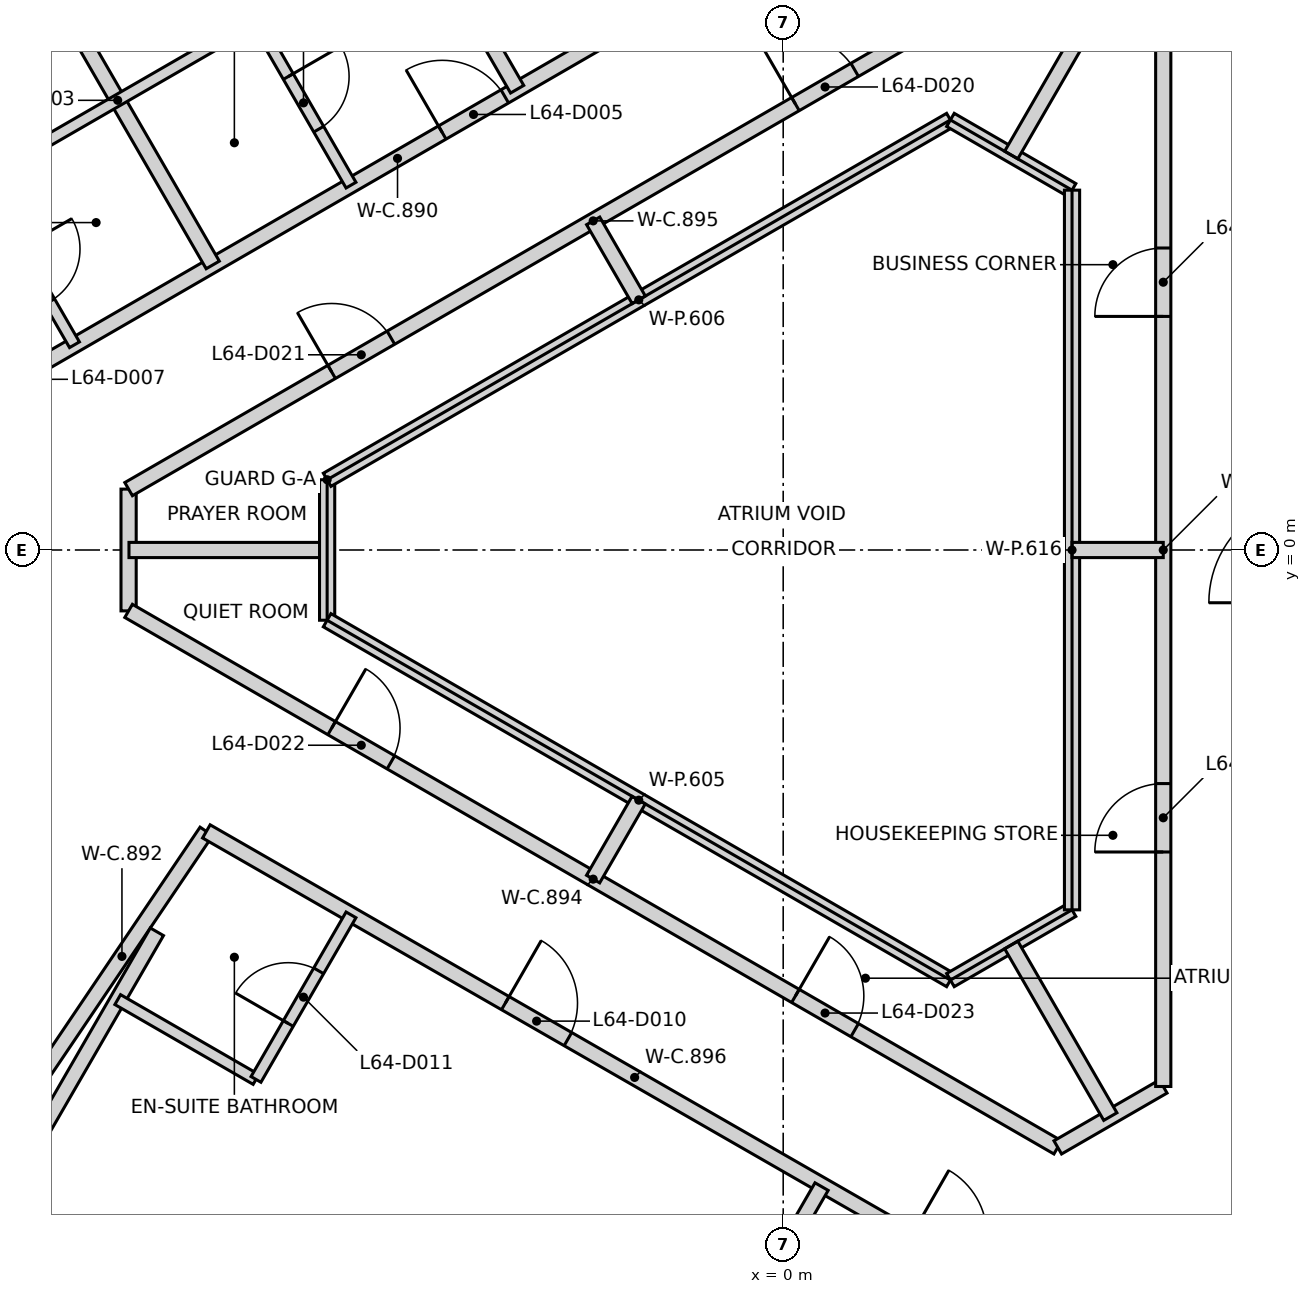
"""IFC4 building model, lengths in metres.
Left out: names, types, materials, properties, quantities, classifications, styles, units other than length and angle.
Written with IfcOpenShell. Run it as: python <this file> out.ifc"""

import sys

from ifc_helpers import new_model, si_unit, direction, frame, frame_2d, origin, place, context, subcontext, project, spatial, rectangle, extrude, element, fill, save


model = new_model("IFC4")
c1 = context("Model", 3, precision=1e-05, world=origin(), true_north=direction((0.0, 1.0)))
c2 = subcontext(c1, "Body", "Model", "MODEL_VIEW")
j1 = project(units=[si_unit("LENGTHUNIT", "METRE"), si_unit("PLANEANGLEUNIT", "RADIAN")], contexts=[c1])
p1 = place(None, origin())
s1 = spatial("IfcSite", under=j1, at=p1, CompositionType="ELEMENT")
p2 = place(p1, origin())
s2 = spatial("IfcBuilding", under=s1, at=p2, CompositionType="ELEMENT")
p3 = place(p2, frame((0.0, 0.0, 253.8)))
s3 = spatial("IfcBuildingStorey", under=s2, at=p3, CompositionType="ELEMENT", Elevation=253.8)
p4 = place(p3, frame((10.42, 6.498, 0.0), z_axis=(0.0, 0.0, 1.0), x_axis=(-0.866021906294, 0.500006057782, 0.0)))
e1 = element("IfcWall", 1, at=p4, inside=s3, PredefinedType="SHEAR", context=c2, shape_type="SweptSolid", body=[
    extrude(rectangle(XDim=11.55, YDim=0.25, at=frame_2d((5.775, 0.0))), origin(), (0.0, 0.0, 1.0), 3.2),
])
p5 = place(p4, frame((10.025, 0.0, 0.0)))
e2 = element("IfcOpeningElement", 2, at=p5, cuts=e1, PredefinedType="OPENING", context=c2, shape_type="SweptSolid", body=[
    extrude(rectangle(XDim=1.2, YDim=2.1, at=frame_2d((0.6, 1.05))), frame((0.0, 0.135, 0.0), z_axis=(0.0, -1.0, 0.0), x_axis=(1.0, 0.0, 0.0)), (0.0, 0.0, 1.0), 0.27),
])
p6 = place(p4, frame((8.725, 0.0, 0.0)))
e3 = element("IfcOpeningElement", 3, at=p6, cuts=e1, PredefinedType="OPENING", context=c2, shape_type="SweptSolid", body=[
    extrude(rectangle(XDim=1.2, YDim=2.1, at=frame_2d((0.6, 1.05))), frame((0.0, 0.135, 0.0), z_axis=(0.0, -1.0, 0.0), x_axis=(1.0, 0.0, 0.0)), (0.0, 0.0, 1.0), 0.27),
])
p7 = place(p3, frame((0.417, -12.273, 0.0), z_axis=(0.0, 0.0, 1.0), x_axis=(0.866021906294, 0.500006057782, 0.0)))
e4 = element("IfcWall", 4, at=p7, inside=s3, PredefinedType="SHEAR", context=c2, shape_type="SweptSolid", body=[
    extrude(rectangle(XDim=11.55, YDim=0.25, at=frame_2d((5.775, 0.0))), origin(), (0.0, 0.0, 1.0), 3.2),
])
p8 = place(p7, frame((10.025, 0.0, 0.0)))
e5 = element("IfcOpeningElement", 5, at=p8, cuts=e4, PredefinedType="OPENING", context=c2, shape_type="SweptSolid", body=[
    extrude(rectangle(XDim=1.2, YDim=2.1, at=frame_2d((0.6, 1.05))), frame((0.0, 0.135, 0.0), z_axis=(0.0, -1.0, 0.0), x_axis=(1.0, 0.0, 0.0)), (0.0, 0.0, 1.0), 0.27),
])
p9 = place(p7, frame((8.725, 0.0, 0.0)))
e6 = element("IfcOpeningElement", 6, at=p9, cuts=e4, PredefinedType="OPENING", context=c2, shape_type="SweptSolid", body=[
    extrude(rectangle(XDim=1.2, YDim=2.1, at=frame_2d((0.6, 1.05))), frame((0.0, 0.135, 0.0), z_axis=(0.0, -1.0, 0.0), x_axis=(1.0, 0.0, 0.0)), (0.0, 0.0, 1.0), 0.27),
])
p10 = place(p3, frame((-10.652, 1.928, 0.0), z_axis=(0.0, 0.0, 1.0), x_axis=(0.865793573301, 0.500401327367, 0.0)))
e7 = element("IfcWall", 7, at=p10, inside=s3, PredefinedType="PARTITIONING", context=c2, shape_type="SweptSolid", body=[
    extrude(rectangle(XDim=12.886, YDim=0.2, at=frame_2d((6.443, 0.0))), origin(), (0.0, 0.0, 1.0), 3.2),
])
p11 = place(p10, frame((7.123, 0.0, 0.0)))
e8 = element("IfcOpeningElement", 8, at=p11, cuts=e7, PredefinedType="OPENING", context=c2, shape_type="SweptSolid", body=[
    extrude(rectangle(XDim=0.95, YDim=2.1, at=frame_2d((0.475, 1.05))), frame((0.0, 0.11, 0.0), z_axis=(0.0, -1.0, 0.0), x_axis=(1.0, 0.0, 0.0)), (0.0, 0.0, 1.0), 0.22),
])
p12 = place(p10, frame((0.16, 0.0, 0.0)))
e9 = element("IfcOpeningElement", 9, at=p12, cuts=e7, PredefinedType="OPENING", context=c2, shape_type="SweptSolid", body=[
    extrude(rectangle(XDim=0.95, YDim=2.1, at=frame_2d((0.475, 1.05))), frame((0.0, 0.11, 0.0), z_axis=(0.0, -1.0, 0.0), x_axis=(1.0, 0.0, 0.0)), (0.0, 0.0, 1.0), 0.22),
])
p13 = place(p3, frame((-9.81, -6.991, 0.0), z_axis=(0.0, 0.0, 1.0), x_axis=(0.559616535009, 0.828751671941, 0.0)))
e10 = element("IfcWall", 10, at=p13, inside=s3, PredefinedType="PARTITIONING", context=c2, shape_type="SweptSolid", body=[
    extrude(rectangle(XDim=3.969, YDim=0.2, at=frame_2d((1.984, 0.0))), origin(), (0.0, 0.0, 1.0), 3.2),
])
p14 = place(p3, frame((-8.612, -0.801, 0.0), z_axis=(0.0, 0.0, 1.0), x_axis=(0.0, 1.0, 0.0)))
e11 = element("IfcWall", 11, at=p14, inside=s3, PredefinedType="PARTITIONING", context=c2, shape_type="SweptSolid", body=[
    extrude(rectangle(XDim=1.602, YDim=0.2, at=frame_2d((0.801, 0.0))), origin(), (0.0, 0.0, 1.0), 3.2),
])
p15 = place(p3, frame((-8.612, -0.801, 0.0), z_axis=(0.0, 0.0, 1.0), x_axis=(0.865998070783, -0.50004733916, 0.0)))
e12 = element("IfcWall", 12, at=p15, inside=s3, PredefinedType="PARTITIONING", context=c2, shape_type="SweptSolid", body=[
    extrude(rectangle(XDim=14.115, YDim=0.2, at=frame_2d((7.058, 0.0))), origin(), (0.0, 0.0, 1.0), 3.2),
])
p16 = place(p15, frame((3.085, 0.0, 0.0)))
e13 = element("IfcOpeningElement", 13, at=p16, cuts=e12, PredefinedType="OPENING", context=c2, shape_type="SweptSolid", body=[
    extrude(rectangle(XDim=0.9, YDim=2.1, at=frame_2d((0.45, 1.05))), frame((0.0, 0.11, 0.0), z_axis=(0.0, -1.0, 0.0), x_axis=(1.0, 0.0, 0.0)), (0.0, 0.0, 1.0), 0.22),
])
p17 = place(p15, frame((10.131, 0.0, 0.0)))
e14 = element("IfcOpeningElement", 14, at=p17, cuts=e12, PredefinedType="OPENING", context=c2, shape_type="SweptSolid", body=[
    extrude(rectangle(XDim=0.9, YDim=2.1, at=frame_2d((0.45, 1.05))), frame((0.0, 0.11, 0.0), z_axis=(0.0, -1.0, 0.0), x_axis=(1.0, 0.0, 0.0)), (0.0, 0.0, 1.0), 0.22),
])
p18 = place(p3, frame((-8.612, 0.801, 0.0), z_axis=(0.0, 0.0, 1.0), x_axis=(0.866005560651, 0.500034367741, 0.0)))
e15 = element("IfcWall", 15, at=p18, inside=s3, PredefinedType="PARTITIONING", context=c2, shape_type="SweptSolid", body=[
    extrude(rectangle(XDim=14.115, YDim=0.2, at=frame_2d((7.058, 0.0))), origin(), (0.0, 0.0, 1.0), 3.2),
])
p19 = place(p18, frame((10.131, 0.0, 0.0)))
e16 = element("IfcOpeningElement", 16, at=p19, cuts=e15, PredefinedType="OPENING", context=c2, shape_type="SweptSolid", body=[
    extrude(rectangle(XDim=0.9, YDim=2.1, at=frame_2d((0.45, 1.05))), frame((0.0, 0.11, 0.0), z_axis=(0.0, -1.0, 0.0), x_axis=(1.0, 0.0, 0.0)), (0.0, 0.0, 1.0), 0.22),
])
p20 = place(p18, frame((3.085, 0.0, 0.0)))
e17 = element("IfcOpeningElement", 17, at=p20, cuts=e15, PredefinedType="OPENING", context=c2, shape_type="SweptSolid", body=[
    extrude(rectangle(XDim=0.9, YDim=2.1, at=frame_2d((0.45, 1.05))), frame((0.0, 0.11, 0.0), z_axis=(0.0, -1.0, 0.0), x_axis=(1.0, 0.0, 0.0)), (0.0, 0.0, 1.0), 0.22),
])
p21 = place(p3, frame((-7.589, -3.702, 0.0), z_axis=(0.0, 0.0, 1.0), x_axis=(0.867107959402, -0.498120253293, 0.0)))
e18 = element("IfcWall", 18, at=p21, inside=s3, PredefinedType="PARTITIONING", context=c2, shape_type="SweptSolid", body=[
    extrude(rectangle(XDim=12.996, YDim=0.2, at=frame_2d((6.498, 0.0))), origin(), (0.0, 0.0, 1.0), 3.2),
])
p22 = place(p21, frame((4.536, 0.0, 0.0)))
e19 = element("IfcOpeningElement", 19, at=p22, cuts=e18, PredefinedType="OPENING", context=c2, shape_type="SweptSolid", body=[
    extrude(rectangle(XDim=0.95, YDim=2.1, at=frame_2d((0.475, 1.05))), frame((0.0, 0.11, 0.0), z_axis=(0.0, -1.0, 0.0), x_axis=(1.0, 0.0, 0.0)), (0.0, 0.0, 1.0), 0.22),
])
p23 = place(p21, frame((10.691, 0.0, 0.0)))
e20 = element("IfcOpeningElement", 20, at=p23, cuts=e18, PredefinedType="OPENING", context=c2, shape_type="SweptSolid", body=[
    extrude(rectangle(XDim=1.0, YDim=2.1, at=frame_2d((0.5, 1.05))), frame((0.0, 0.11, 0.0), z_axis=(0.0, -1.0, 0.0), x_axis=(1.0, 0.0, 0.0)), (0.0, 0.0, 1.0), 0.22),
])
p24 = place(p3, frame((3.612, -7.859, 0.0), z_axis=(0.0, 0.0, 1.0), x_axis=(0.866002901518, 0.500038973044, 0.0)))
e21 = element("IfcWall", 21, at=p24, inside=s3, PredefinedType="PARTITIONING", context=c2, shape_type="SweptSolid", body=[
    extrude(rectangle(XDim=1.602, YDim=0.2, at=frame_2d((0.801, 0.0))), origin(), (0.0, 0.0, 1.0), 3.2),
])
p25 = place(p3, frame((5.0, -7.058, 0.0), z_axis=(0.0, 0.0, 1.0), x_axis=(0.0, 1.0, 0.0)))
e22 = element("IfcWall", 22, at=p25, inside=s3, PredefinedType="PARTITIONING", context=c2, shape_type="SweptSolid", body=[
    extrude(rectangle(XDim=14.116, YDim=0.2, at=frame_2d((7.058, 0.0))), origin(), (0.0, 0.0, 1.0), 3.2),
])
p26 = place(p25, frame((3.085, 0.0, 0.0)))
e23 = element("IfcOpeningElement", 23, at=p26, cuts=e22, PredefinedType="OPENING", context=c2, shape_type="SweptSolid", body=[
    extrude(rectangle(XDim=0.9, YDim=2.1, at=frame_2d((0.45, 1.05))), frame((0.0, 0.11, 0.0), z_axis=(0.0, -1.0, 0.0), x_axis=(1.0, 0.0, 0.0)), (0.0, 0.0, 1.0), 0.22),
])
p27 = place(p25, frame((10.131, 0.0, 0.0)))
e24 = element("IfcOpeningElement", 24, at=p27, cuts=e22, PredefinedType="OPENING", context=c2, shape_type="SweptSolid", body=[
    extrude(rectangle(XDim=0.9, YDim=2.1, at=frame_2d((0.45, 1.05))), frame((0.0, 0.11, 0.0), z_axis=(0.0, -1.0, 0.0), x_axis=(1.0, 0.0, 0.0)), (0.0, 0.0, 1.0), 0.22),
])
p28 = place(p3, frame((-13.107, 13.453, 0.0), z_axis=(0.0, 0.0, 1.0), x_axis=(0.50003870279, -0.866003057565, 0.0)))
e25 = element("IfcWall", 25, at=p28, inside=s3, PredefinedType="PARTITIONING", context=c2, shape_type="SweptSolid", body=[
    extrude(rectangle(XDim=11.204, YDim=0.2, at=frame_2d((5.602, 0.0))), origin(), (0.0, 0.0, 1.0), 3.2),
])
p29 = place(p3, frame((-13.107, -13.453, 0.0), z_axis=(0.0, 0.0, 1.0), x_axis=(0.500058218288, 0.865991788831, 0.0)))
e26 = element("IfcWall", 26, at=p29, inside=s3, PredefinedType="PARTITIONING", context=c2, shape_type="SweptSolid", body=[
    extrude(rectangle(XDim=9.735, YDim=0.2, at=frame_2d((4.867, 0.0))), origin(), (0.0, 0.0, 1.0), 3.2),
])
p30 = place(p3, frame((-9.119, 15.795, 0.0), z_axis=(0.0, 0.0, 1.0), x_axis=(0.500015176972, -0.866016641178, 0.0)))
e27 = element("IfcWall", 27, at=p30, inside=s3, PredefinedType="PARTITIONING", context=c2, shape_type="SweptSolid", body=[
    extrude(rectangle(XDim=11.239, YDim=0.2, at=frame_2d((5.619, 0.0))), origin(), (0.0, 0.0, 1.0), 3.2),
])
p31 = place(p3, frame((-8.607, 0.0, 0.0), z_axis=(0.0, 0.0, 1.0), x_axis=(1.0, 0.0, 0.0)))
e28 = element("IfcWall", 28, at=p31, inside=s3, PredefinedType="PARTITIONING", context=c2, shape_type="SweptSolid", body=[
    extrude(rectangle(XDim=2.607, YDim=0.2, at=frame_2d((1.303, 0.0))), origin(), (0.0, 0.0, 1.0), 3.2),
])
p32 = place(p3, frame((-6.0, -0.924, 0.0), z_axis=(0.0, 0.0, 1.0), x_axis=(0.0, 1.0, 0.0)))
e29 = element("IfcWall", 29, at=p32, inside=s3, PredefinedType="PARTITIONING", context=c2, shape_type="SweptSolid", body=[
    extrude(rectangle(XDim=1.848, YDim=0.2, at=frame_2d((0.924, 0.0))), origin(), (0.0, 0.0, 1.0), 3.2),
])
for number, where, z_axis, x_axis in (
    (30, (-6.0, -0.924, 0.0), (0.0, 0.0, 1.0), (0.866, -0.5, 0.0)),
    (31, (-6.0, 0.924, 0.0), (0.0, 0.0, 1.0), (0.866, 0.5, 0.0)),
):
    element("IfcWall", number, at=place(p3, frame(where, z_axis=z_axis, x_axis=x_axis)), inside=s3, PredefinedType="PARTITIONING", context=c2, shape_type="SweptSolid", body=[
        extrude(rectangle(XDim=9.468, YDim=0.2, at=frame_2d((4.734, 0.0))), origin(), (0.0, 0.0, 1.0), 3.2),
    ])
p33 = place(p3, frame((-5.097, -18.078, 0.0), z_axis=(0.0, 0.0, 1.0), x_axis=(0.49996389635, 0.866046247233, 0.0)))
e32 = element("IfcWall", 32, at=p33, inside=s3, PredefinedType="PARTITIONING", context=c2, shape_type="SweptSolid", body=[
    extrude(rectangle(XDim=11.204, YDim=0.2, at=frame_2d((5.602, 0.0))), origin(), (0.0, 0.0, 1.0), 3.2),
])
for number, where, z_axis, x_axis in (
    (33, (-2.501, -4.329, 0.0), (0.0, 0.0, 1.0), (0.5, 0.866, 0.0)),
    (34, (-2.5, 4.33, 0.0), (0.0, 0.0, 1.0), (0.5, -0.866, 0.0)),
):
    element("IfcWall", number, at=place(p3, frame(where, z_axis=z_axis, x_axis=x_axis)), inside=s3, PredefinedType="PARTITIONING", context=c2, shape_type="SweptSolid", body=[
        extrude(rectangle(XDim=1.2, YDim=0.2, at=frame_2d((0.6, 0.0))), origin(), (0.0, 0.0, 1.0), 3.2),
    ])
for number, where, z_axis, x_axis in (
    (35, (2.2, -5.658, 0.0), (0.0, 0.0, 1.0), (0.866, 0.5, 0.0)),
    (36, (2.2, 5.658, 0.0), (0.0, 0.0, 1.0), (0.866, -0.5, 0.0)),
):
    element("IfcWall", number, at=place(p3, frame(where, z_axis=z_axis, x_axis=x_axis)), inside=s3, PredefinedType="PARTITIONING", context=c2, shape_type="SweptSolid", body=[
        extrude(rectangle(XDim=1.848, YDim=0.2, at=frame_2d((0.924, 0.0))), origin(), (0.0, 0.0, 1.0), 3.2),
    ])
for number, where, z_axis, x_axis in (
    (37, (3.0, 5.196, 0.0), (0.0, 0.0, 1.0), (0.5, 0.866, 0.0)),
    (38, (3.0, -5.196, 0.0), (0.0, 0.0, 1.0), (0.5, -0.866, 0.0)),
):
    element("IfcWall", number, at=place(p3, frame(where, z_axis=z_axis, x_axis=x_axis)), inside=s3, PredefinedType="PARTITIONING", context=c2, shape_type="SweptSolid", body=[
        extrude(rectangle(XDim=2.607, YDim=0.2, at=frame_2d((1.304, 0.0))), origin(), (0.0, 0.0, 1.0), 3.2),
    ])
p34 = place(p3, frame((3.8, -4.734, 0.0), z_axis=(0.0, 0.0, 1.0), x_axis=(0.0, 1.0, 0.0)))
e39 = element("IfcWall", 39, at=p34, inside=s3, PredefinedType="PARTITIONING", context=c2, shape_type="SweptSolid", body=[
    extrude(rectangle(XDim=9.468, YDim=0.2, at=frame_2d((4.734, 0.0))), origin(), (0.0, 0.0, 1.0), 3.2),
])
p35 = place(p3, frame((3.8, 0.0, 0.0), z_axis=(0.0, 0.0, 1.0), x_axis=(1.0, 0.0, 0.0)))
e40 = element("IfcWall", 40, at=p35, inside=s3, PredefinedType="PARTITIONING", context=c2, shape_type="SweptSolid", body=[
    extrude(rectangle(XDim=1.2, YDim=0.2, at=frame_2d((0.6, 0.0))), origin(), (0.0, 0.0, 1.0), 3.2),
])
p36 = place(p3, frame((-10.574, 4.866, 0.0), z_axis=(0.0, 0.0, 1.0), x_axis=(0.866052994476, 0.499952208475, 0.0)))
e41 = element("IfcWall", 41, at=p36, inside=s3, PredefinedType="PARTITIONING", context=c2, shape_type="SweptSolid", body=[
    extrude(rectangle(XDim=4.201, YDim=0.15, at=frame_2d((2.1, 0.0))), origin(), (0.0, 0.0, 1.0), 3.2),
])
p37 = place(p3, frame((-10.574, 4.865, 0.0), z_axis=(0.0, 0.0, 1.0), x_axis=(0.500004234368, -0.866022959057, 0.0)))
e42 = element("IfcWall", 42, at=p37, inside=s3, PredefinedType="PARTITIONING", context=c2, shape_type="SweptSolid", body=[
    extrude(rectangle(XDim=2.5, YDim=0.15, at=frame_2d((1.25, 0.0))), origin(), (0.0, 0.0, 1.0), 3.2),
])
p38 = place(p37, frame((1.045, 0.0, 0.0)))
e43 = element("IfcOpeningElement", 43, at=p38, cuts=e42, PredefinedType="OPENING", context=c2, shape_type="SweptSolid", body=[
    extrude(rectangle(XDim=0.8, YDim=2.1, at=frame_2d((0.4, 1.05))), frame((0.0, 0.085, 0.0), z_axis=(0.0, -1.0, 0.0), x_axis=(1.0, 0.0, 0.0)), (0.0, 0.0, 1.0), 0.17),
])
p39 = place(p3, frame((-8.755, -5.915, 0.0), z_axis=(0.0, 0.0, 1.0), x_axis=(0.866038466041, -0.499977374825, 0.0)))
e44 = element("IfcWall", 44, at=p39, inside=s3, PredefinedType="PARTITIONING", context=c2, shape_type="SweptSolid", body=[
    extrude(rectangle(XDim=2.1, YDim=0.15, at=frame_2d((1.05, 0.0))), origin(), (0.0, 0.0, 1.0), 3.2),
])
p40 = place(p3, frame((-6.936, -6.965, 0.0), z_axis=(0.0, 0.0, 1.0), x_axis=(0.500004234368, 0.866022959057, 0.0)))
e45 = element("IfcWall", 45, at=p40, inside=s3, PredefinedType="PARTITIONING", context=c2, shape_type="SweptSolid", body=[
    extrude(rectangle(XDim=2.5, YDim=0.15, at=frame_2d((1.25, 0.0))), origin(), (0.0, 0.0, 1.0), 3.2),
])
p41 = place(p40, frame((0.85, 0.0, 0.0)))
e46 = element("IfcOpeningElement", 46, at=p41, cuts=e45, PredefinedType="OPENING", context=c2, shape_type="SweptSolid", body=[
    extrude(rectangle(XDim=0.8, YDim=2.1, at=frame_2d((0.4, 1.05))), frame((0.0, 0.085, 0.0), z_axis=(0.0, -1.0, 0.0), x_axis=(1.0, 0.0, 0.0)), (0.0, 0.0, 1.0), 0.17),
])
p42 = place(p3, frame((-6.936, 6.965, 0.0), z_axis=(0.0, 0.0, 1.0), x_axis=(0.500004234368, -0.866022959057, 0.0)))
e47 = element("IfcWall", 47, at=p42, inside=s3, PredefinedType="PARTITIONING", context=c2, shape_type="SweptSolid", body=[
    extrude(rectangle(XDim=2.5, YDim=0.15, at=frame_2d((1.25, 0.0))), origin(), (0.0, 0.0, 1.0), 3.2),
])
p43 = place(p42, frame((0.85, 0.0, 0.0)))
e48 = element("IfcOpeningElement", 48, at=p43, cuts=e47, PredefinedType="OPENING", context=c2, shape_type="SweptSolid", body=[
    extrude(rectangle(XDim=0.8, YDim=2.1, at=frame_2d((0.4, 1.05))), frame((0.0, 0.085, 0.0), z_axis=(0.0, -1.0, 0.0), x_axis=(1.0, 0.0, 0.0)), (0.0, 0.0, 1.0), 0.17),
])
p44 = place(p11, origin())
e49 = element("IfcDoor", 49, at=p44, inside=s3, OperationType="SINGLE_SWING_LEFT", PredefinedType="DOOR", context=c2, shape_type="SweptSolid", body=[
    extrude(rectangle(XDim=0.95, YDim=2.1, at=frame_2d((0.475, 1.05))), frame((0.0, 0.025, 0.0), z_axis=(0.0, -1.0, 0.0), x_axis=(1.0, 0.0, 0.0)), (0.0, 0.0, 1.0), 0.05),
])
fill(e8, e49)
p45 = place(p43, origin())
e50 = element("IfcDoor", 50, at=p45, inside=s3, OperationType="SINGLE_SWING_LEFT", PredefinedType="DOOR", context=c2, shape_type="SweptSolid", body=[
    extrude(rectangle(XDim=0.8, YDim=2.1, at=frame_2d((0.4, 1.05))), frame((0.0, 0.025, 0.0), z_axis=(0.0, -1.0, 0.0), x_axis=(1.0, 0.0, 0.0)), (0.0, 0.0, 1.0), 0.05),
])
fill(e48, e50)
p46 = place(p22, frame((0.95, 0.0, 0.0), z_axis=(0.0, 0.0, 1.0), x_axis=(-1.0, 0.0, 0.0)))
e51 = element("IfcDoor", 51, at=p46, inside=s3, OperationType="SINGLE_SWING_LEFT", PredefinedType="DOOR", context=c2, shape_type="SweptSolid", body=[
    extrude(rectangle(XDim=0.95, YDim=2.1, at=frame_2d((0.475, 1.05))), frame((0.0, 0.025, 0.0), z_axis=(0.0, -1.0, 0.0), x_axis=(1.0, 0.0, 0.0)), (0.0, 0.0, 1.0), 0.05),
])
fill(e19, e51)
p47 = place(p41, frame((0.8, 0.0, 0.0), z_axis=(0.0, 0.0, 1.0), x_axis=(-1.0, 0.0, 0.0)))
e52 = element("IfcDoor", 52, at=p47, inside=s3, OperationType="SINGLE_SWING_LEFT", PredefinedType="DOOR", context=c2, shape_type="SweptSolid", body=[
    extrude(rectangle(XDim=0.8, YDim=2.1, at=frame_2d((0.4, 1.05))), frame((0.0, 0.025, 0.0), z_axis=(0.0, -1.0, 0.0), x_axis=(1.0, 0.0, 0.0)), (0.0, 0.0, 1.0), 0.05),
])
fill(e46, e52)
p48 = place(p26, origin())
e53 = element("IfcDoor", 53, at=p48, inside=s3, OperationType="SINGLE_SWING_LEFT", PredefinedType="DOOR", context=c2, shape_type="SweptSolid", body=[
    extrude(rectangle(XDim=0.9, YDim=2.1, at=frame_2d((0.45, 1.05))), frame((0.0, 0.025, 0.0), z_axis=(0.0, -1.0, 0.0), x_axis=(1.0, 0.0, 0.0)), (0.0, 0.0, 1.0), 0.05),
])
fill(e23, e53)
p49 = place(p27, origin())
e54 = element("IfcDoor", 54, at=p49, inside=s3, OperationType="SINGLE_SWING_LEFT", PredefinedType="DOOR", context=c2, shape_type="SweptSolid", body=[
    extrude(rectangle(XDim=0.9, YDim=2.1, at=frame_2d((0.45, 1.05))), frame((0.0, 0.025, 0.0), z_axis=(0.0, -1.0, 0.0), x_axis=(1.0, 0.0, 0.0)), (0.0, 0.0, 1.0), 0.05),
])
fill(e24, e54)
p50 = place(p19, frame((0.9, 0.0, 0.0), z_axis=(0.0, 0.0, 1.0), x_axis=(-1.0, 0.0, 0.0)))
e55 = element("IfcDoor", 55, at=p50, inside=s3, OperationType="SINGLE_SWING_LEFT", PredefinedType="DOOR", context=c2, shape_type="SweptSolid", body=[
    extrude(rectangle(XDim=0.9, YDim=2.1, at=frame_2d((0.45, 1.05))), frame((0.0, 0.025, 0.0), z_axis=(0.0, -1.0, 0.0), x_axis=(1.0, 0.0, 0.0)), (0.0, 0.0, 1.0), 0.05),
])
fill(e16, e55)
p51 = place(p20, frame((0.9, 0.0, 0.0), z_axis=(0.0, 0.0, 1.0), x_axis=(-1.0, 0.0, 0.0)))
e56 = element("IfcDoor", 56, at=p51, inside=s3, OperationType="SINGLE_SWING_LEFT", PredefinedType="DOOR", context=c2, shape_type="SweptSolid", body=[
    extrude(rectangle(XDim=0.9, YDim=2.1, at=frame_2d((0.45, 1.05))), frame((0.0, 0.025, 0.0), z_axis=(0.0, -1.0, 0.0), x_axis=(1.0, 0.0, 0.0)), (0.0, 0.0, 1.0), 0.05),
])
fill(e17, e56)
p52 = place(p16, origin())
e57 = element("IfcDoor", 57, at=p52, inside=s3, OperationType="SINGLE_SWING_LEFT", PredefinedType="DOOR", context=c2, shape_type="SweptSolid", body=[
    extrude(rectangle(XDim=0.9, YDim=2.1, at=frame_2d((0.45, 1.05))), frame((0.0, 0.025, 0.0), z_axis=(0.0, -1.0, 0.0), x_axis=(1.0, 0.0, 0.0)), (0.0, 0.0, 1.0), 0.05),
])
fill(e13, e57)
p53 = place(p17, origin())
e58 = element("IfcDoor", 58, at=p53, inside=s3, OperationType="SINGLE_SWING_LEFT", PredefinedType="DOOR", context=c2, shape_type="SweptSolid", body=[
    extrude(rectangle(XDim=0.9, YDim=2.1, at=frame_2d((0.45, 1.05))), frame((0.0, 0.025, 0.0), z_axis=(0.0, -1.0, 0.0), x_axis=(1.0, 0.0, 0.0)), (0.0, 0.0, 1.0), 0.05),
])
fill(e14, e58)
save(model, sys.argv[1])
